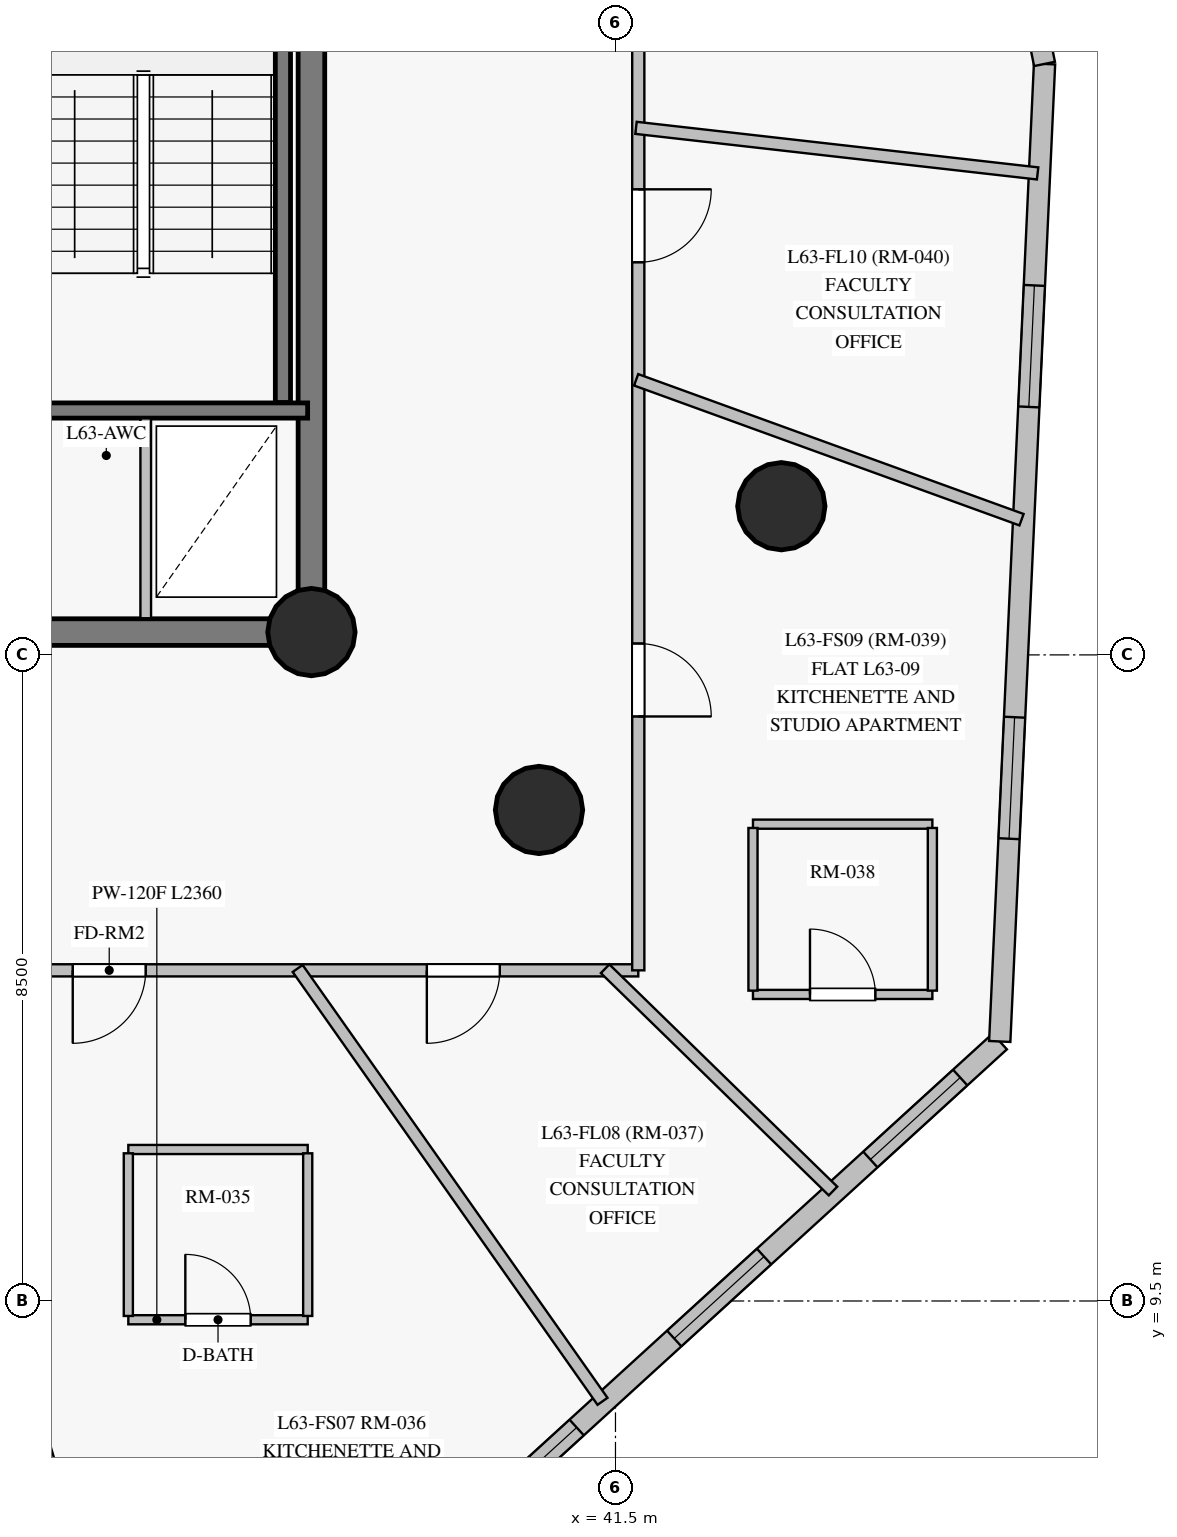
"""IFC4 building model, lengths in metres.
Left out: names, types, materials, properties, quantities, classifications, styles, units other than length and angle.
Written with IfcOpenShell. Run it as: python <this file> out.ifc"""

import sys

from ifc_helpers import new_model, si_unit, direction, frame, frame_2d, origin, origin_with_axes, origin_2d, place, context, subcontext, project, spatial, rectangle, circle, extrude, source, transform, mapped, element, fill, save


model = new_model("IFC4")
c1 = context("Model", 3, precision=1e-05, world=origin(), true_north=direction((0.0, 1.0)))
c2 = subcontext(c1, "Body", "Model", "MODEL_VIEW")
j1 = project(units=[si_unit("LENGTHUNIT", "METRE"), si_unit("PLANEANGLEUNIT", "RADIAN")], contexts=[c1])
p1 = place(None, origin())
s1 = spatial("IfcSite", under=j1, at=p1, CompositionType="ELEMENT")
p2 = place(p1, origin())
s2 = spatial("IfcBuilding", under=s1, at=p2, CompositionType="ELEMENT")
p3 = place(p2, frame((0.0, 0.0, 216.9)))
s3 = spatial("IfcBuildingStorey", under=s2, at=p3, CompositionType="ELEMENT", Elevation=216.9)
p4 = place(p3, frame((26.55, 18.3, 0.0), z_axis=(0.0, 0.0, 1.0), x_axis=(1.0, 0.0, 0.0)))
e1 = element("IfcWall", 1, at=p4, inside=s3, PredefinedType="SHEAR", context=c2, shape_type="SweptSolid", body=[
    extrude(rectangle(XDim=10.95, YDim=0.35, at=frame_2d((5.475, 0.0))), origin(), (0.0, 0.0, 1.0), 2.85),
])
p5 = place(p4, frame((4.55, 0.0, 0.0)))
e2 = element("IfcOpeningElement", 2, at=p5, cuts=e1, PredefinedType="OPENING", context=c2, shape_type="SweptSolid", body=[
    extrude(rectangle(XDim=1.4, YDim=2.2, at=frame_2d((0.7, 1.1))), frame((0.0, 0.185, 0.0), z_axis=(0.0, -1.0, 0.0), x_axis=(1.0, 0.0, 0.0)), (0.0, 0.0, 1.0), 0.37),
])
p6 = place(p3, frame((37.5, 18.3, 0.0), z_axis=(0.0, 0.0, 1.0), x_axis=(0.0, 1.0, 0.0)))
e3 = element("IfcWall", 3, at=p6, inside=s3, PredefinedType="SHEAR", context=c2, shape_type="SweptSolid", body=[
    extrude(rectangle(XDim=16.4, YDim=0.35, at=frame_2d((8.2, 0.0))), origin(), (0.0, 0.0, 1.0), 2.85),
])
p7 = place(p6, frame((13.85, 0.0, 0.0)))
e4 = element("IfcOpeningElement", 4, at=p7, cuts=e3, PredefinedType="OPENING", context=c2, shape_type="SweptSolid", body=[
    extrude(rectangle(XDim=1.2, YDim=2.15, at=frame_2d((0.6, 1.075))), frame((0.0, 0.185, 0.0), z_axis=(0.0, -1.0, 0.0), x_axis=(1.0, 0.0, 0.0)), (0.0, 0.0, 1.0), 0.37),
])
m1 = source(origin_with_axes(), c2, "Body", "SweptSolid", [
    extrude(circle(Radius=0.575, at=origin_2d()), origin(), (0.0, 0.0, 1.0), 3.05),
])
for number, where, z_axis, x_axis in (
    (5, (37.5, 18.3, 0.0), (0.0, 0.0, 1.0), (1.0, 0.0, 0.0)),
    (6, (43.682, 19.956, 0.0), (0.0, 0.0, 1.0), (1.0, 0.0, 0.0)),
    (7, (40.494, 15.96, 0.0), (0.0, 0.0, 1.0), (1.0, 0.0, 0.0)),
):
    element("IfcColumn", number, at=place(p3, frame(where, z_axis=z_axis, x_axis=x_axis)), inside=s3, PredefinedType="COLUMN", context=c2, shape_type="MappedRepresentation", body=[
        mapped(m1, transform((0.0, 0.0, 0.0), scale=1.0)),
    ])
p8 = place(p3, frame((39.403, 6.388, 0.0), z_axis=(0.0, 0.0, 1.0), x_axis=(0.738681440001, 0.674054693774, 0.0)))
e8 = element("IfcWall", 8, at=p8, inside=s3, PredefinedType="SOLIDWALL", context=c2, shape_type="SweptSolid", body=[
    extrude(rectangle(XDim=9.682, YDim=0.28, at=frame_2d((4.841, 0.0))), origin(), (0.0, 0.0, 1.0), 2.85),
])
p9 = place(p8, frame((0.548, 0.0, 0.85)))
e9 = element("IfcOpeningElement", 9, at=p9, cuts=e8, PredefinedType="OPENING", context=c2, shape_type="SweptSolid", body=[
    extrude(rectangle(XDim=1.6, YDim=1.6, at=frame_2d((0.8, 0.8))), frame((0.0, 0.15, 0.0), z_axis=(0.0, -1.0, 0.0), x_axis=(1.0, 0.0, 0.0)), (0.0, 0.0, 1.0), 0.3),
])
p10 = place(p8, frame((3.885, 0.0, 0.85)))
e10 = element("IfcOpeningElement", 10, at=p10, cuts=e8, PredefinedType="OPENING", context=c2, shape_type="SweptSolid", body=[
    extrude(rectangle(XDim=1.6, YDim=1.6, at=frame_2d((0.8, 0.8))), frame((0.0, 0.15, 0.0), z_axis=(0.0, -1.0, 0.0), x_axis=(1.0, 0.0, 0.0)), (0.0, 0.0, 1.0), 0.3),
])
p11 = place(p8, frame((7.378, 0.0, 0.85)))
e11 = element("IfcOpeningElement", 11, at=p11, cuts=e8, PredefinedType="OPENING", context=c2, shape_type="SweptSolid", body=[
    extrude(rectangle(XDim=1.6, YDim=1.6, at=frame_2d((0.8, 0.8))), frame((0.0, 0.15, 0.0), z_axis=(0.0, -1.0, 0.0), x_axis=(1.0, 0.0, 0.0)), (0.0, 0.0, 1.0), 0.3),
])
p12 = place(p3, frame((46.555, 12.914, 0.0), z_axis=(0.0, 0.0, 1.0), x_axis=(0.045779275431, 0.998951579378, 0.0)))
e12 = element("IfcWall", 12, at=p12, inside=s3, PredefinedType="SOLIDWALL", context=c2, shape_type="SweptSolid", body=[
    extrude(rectangle(XDim=12.874, YDim=0.28, at=frame_2d((6.437, 0.0))), origin(), (0.0, 0.0, 1.0), 2.85),
])
p13 = place(p12, frame((2.67, 0.0, 0.85)))
e13 = element("IfcOpeningElement", 13, at=p13, cuts=e12, PredefinedType="OPENING", context=c2, shape_type="SweptSolid", body=[
    extrude(rectangle(XDim=1.6, YDim=1.6, at=frame_2d((0.8, 0.8))), frame((0.0, 0.15, 0.0), z_axis=(0.0, -1.0, 0.0), x_axis=(1.0, 0.0, 0.0)), (0.0, 0.0, 1.0), 0.3),
])
p14 = place(p12, frame((8.357, 0.0, 0.85)))
e14 = element("IfcOpeningElement", 14, at=p14, cuts=e12, PredefinedType="OPENING", context=c2, shape_type="SweptSolid", body=[
    extrude(rectangle(XDim=1.6, YDim=1.6, at=frame_2d((0.8, 0.8))), frame((0.0, 0.15, 0.0), z_axis=(0.0, -1.0, 0.0), x_axis=(1.0, 0.0, 0.0)), (0.0, 0.0, 1.0), 0.3),
])
p15 = place(p3, frame((47.145, 25.775, 0.0), z_axis=(0.0, 0.0, 1.0), x_axis=(-0.199719997546, 0.979853010701, 0.0)))
e15 = element("IfcWall", 15, at=p15, inside=s3, PredefinedType="SOLIDWALL", context=c2, shape_type="SweptSolid", body=[
    extrude(rectangle(XDim=8.869, YDim=0.28, at=frame_2d((4.434, 0.0))), origin(), (0.0, 0.0, 1.0), 2.85),
])
p16 = place(p15, frame((1.415, 0.0, 0.85)))
e16 = element("IfcOpeningElement", 16, at=p16, cuts=e15, PredefinedType="OPENING", context=c2, shape_type="SweptSolid", body=[
    extrude(rectangle(XDim=1.6, YDim=1.6, at=frame_2d((0.8, 0.8))), frame((0.0, 0.15, 0.0), z_axis=(0.0, -1.0, 0.0), x_axis=(1.0, 0.0, 0.0)), (0.0, 0.0, 1.0), 0.3),
])
p17 = place(p15, frame((5.086, 0.0, 0.85)))
e17 = element("IfcOpeningElement", 17, at=p17, cuts=e15, PredefinedType="OPENING", context=c2, shape_type="SweptSolid", body=[
    extrude(rectangle(XDim=1.6, YDim=1.6, at=frame_2d((0.8, 0.8))), frame((0.0, 0.15, 0.0), z_axis=(0.0, -1.0, 0.0), x_axis=(1.0, 0.0, 0.0)), (0.0, 0.0, 1.0), 0.3),
])
p18 = place(p3, frame((37.125, 21.32, 0.0), z_axis=(0.0, 0.0, 1.0), x_axis=(0.0, 1.0, 0.0)))
e18 = element("IfcWall", 18, at=p18, inside=s3, PredefinedType="SHEAR", context=c2, shape_type="SweptSolid", body=[
    extrude(rectangle(XDim=7.5, YDim=0.2, at=frame_2d((3.75, 0.0))), origin(), (0.0, 0.0, 1.0), 2.85),
])
p19 = place(p3, frame((33.455, 21.215, 0.0), z_axis=(0.0, 0.0, 1.0), x_axis=(1.0, 0.0, 0.0)))
e19 = element("IfcWall", 19, at=p19, inside=s3, PredefinedType="SHEAR", context=c2, shape_type="SweptSolid", body=[
    extrude(rectangle(XDim=3.995, YDim=0.2, at=frame_2d((1.998, 0.0))), origin(), (0.0, 0.0, 1.0), 2.85),
])
p20 = place(p3, frame((41.8, 13.85, 0.0), z_axis=(0.0, 0.0, 1.0), x_axis=(-1.0, 0.0, 0.0)))
e20 = element("IfcWall", 20, at=p20, inside=s3, PredefinedType="PARTITIONING", context=c2, shape_type="SweptSolid", body=[
    extrude(rectangle(XDim=25.05, YDim=0.16, at=frame_2d((12.525, 0.0))), origin(), (0.0, 0.0, 1.0), 2.3),
])
p21 = place(p20, frame((10.634, 0.0, 0.0)))
e21 = element("IfcOpeningElement", 21, at=p21, cuts=e20, PredefinedType="OPENING", context=c2, shape_type="SweptSolid", body=[
    extrude(rectangle(XDim=0.96, YDim=2.15, at=frame_2d((0.48, 1.075))), frame((0.0, 0.09, 0.0), z_axis=(0.0, -1.0, 0.0), x_axis=(1.0, 0.0, 0.0)), (0.0, 0.0, 1.0), 0.18),
])
p22 = place(p20, frame((6.48, 0.0, 0.0)))
e22 = element("IfcOpeningElement", 22, at=p22, cuts=e20, PredefinedType="OPENING", context=c2, shape_type="SweptSolid", body=[
    extrude(rectangle(XDim=0.96, YDim=2.15, at=frame_2d((0.48, 1.075))), frame((0.0, 0.09, 0.0), z_axis=(0.0, -1.0, 0.0), x_axis=(1.0, 0.0, 0.0)), (0.0, 0.0, 1.0), 0.18),
])
p23 = place(p20, frame((18.752, 0.0, 0.0)))
e23 = element("IfcOpeningElement", 23, at=p23, cuts=e20, PredefinedType="OPENING", context=c2, shape_type="SweptSolid", body=[
    extrude(rectangle(XDim=0.96, YDim=2.15, at=frame_2d((0.48, 1.075))), frame((0.0, 0.09, 0.0), z_axis=(0.0, -1.0, 0.0), x_axis=(1.0, 0.0, 0.0)), (0.0, 0.0, 1.0), 0.18),
])
p24 = place(p20, frame((15.808, 0.0, 0.0)))
e24 = element("IfcOpeningElement", 24, at=p24, cuts=e20, PredefinedType="OPENING", context=c2, shape_type="SweptSolid", body=[
    extrude(rectangle(XDim=0.96, YDim=2.15, at=frame_2d((0.48, 1.075))), frame((0.0, 0.09, 0.0), z_axis=(0.0, -1.0, 0.0), x_axis=(1.0, 0.0, 0.0)), (0.0, 0.0, 1.0), 0.18),
])
p25 = place(p20, frame((13.594, 0.0, 0.0)))
e25 = element("IfcOpeningElement", 25, at=p25, cuts=e20, PredefinedType="OPENING", context=c2, shape_type="SweptSolid", body=[
    extrude(rectangle(XDim=0.96, YDim=2.15, at=frame_2d((0.48, 1.075))), frame((0.0, 0.09, 0.0), z_axis=(0.0, -1.0, 0.0), x_axis=(1.0, 0.0, 0.0)), (0.0, 0.0, 1.0), 0.18),
])
p26 = place(p20, frame((1.822, 0.0, 0.0)))
e26 = element("IfcOpeningElement", 26, at=p26, cuts=e20, PredefinedType="OPENING", context=c2, shape_type="SweptSolid", body=[
    extrude(rectangle(XDim=0.96, YDim=2.15, at=frame_2d((0.48, 1.075))), frame((0.0, 0.09, 0.0), z_axis=(0.0, -1.0, 0.0), x_axis=(1.0, 0.0, 0.0)), (0.0, 0.0, 1.0), 0.18),
])
p27 = place(p3, frame((41.8, 33.45, 0.0), z_axis=(0.0, 0.0, 1.0), x_axis=(0.0, -1.0, 0.0)))
e27 = element("IfcWall", 27, at=p27, inside=s3, PredefinedType="PARTITIONING", context=c2, shape_type="SweptSolid", body=[
    extrude(rectangle(XDim=19.6, YDim=0.16, at=frame_2d((9.8, 0.0))), origin(), (0.0, 0.0, 1.0), 2.3),
])
p28 = place(p27, frame((15.3, 0.0, 0.0)))
e28 = element("IfcOpeningElement", 28, at=p28, cuts=e27, PredefinedType="OPENING", context=c2, shape_type="SweptSolid", body=[
    extrude(rectangle(XDim=0.96, YDim=2.15, at=frame_2d((0.48, 1.075))), frame((0.0, 0.09, 0.0), z_axis=(0.0, -1.0, 0.0), x_axis=(1.0, 0.0, 0.0)), (0.0, 0.0, 1.0), 0.18),
])
p29 = place(p27, frame((9.325, 0.0, 0.0)))
e29 = element("IfcOpeningElement", 29, at=p29, cuts=e27, PredefinedType="OPENING", context=c2, shape_type="SweptSolid", body=[
    extrude(rectangle(XDim=0.96, YDim=2.15, at=frame_2d((0.48, 1.075))), frame((0.0, 0.09, 0.0), z_axis=(0.0, -1.0, 0.0), x_axis=(1.0, 0.0, 0.0)), (0.0, 0.0, 1.0), 0.18),
])
p30 = place(p27, frame((6.385, 0.0, 0.0)))
e30 = element("IfcOpeningElement", 30, at=p30, cuts=e27, PredefinedType="OPENING", context=c2, shape_type="SweptSolid", body=[
    extrude(rectangle(XDim=0.96, YDim=2.15, at=frame_2d((0.48, 1.075))), frame((0.0, 0.09, 0.0), z_axis=(0.0, -1.0, 0.0), x_axis=(1.0, 0.0, 0.0)), (0.0, 0.0, 1.0), 0.18),
])
p31 = place(p3, frame((32.14, 13.879, 0.0), z_axis=(0.0, 0.0, 1.0), x_axis=(0.281466023859, -0.959571194552, 0.0)))
e31 = element("IfcWall", 31, at=p31, inside=s3, PredefinedType="PARTITIONING", context=c2, shape_type="SweptSolid", body=[
    extrude(rectangle(XDim=8.344, YDim=0.16, at=frame_2d((4.172, 0.0))), origin(), (0.0, 0.0, 1.0), 2.85),
])
p32 = place(p3, frame((37.319, 13.875, 0.0), z_axis=(0.0, 0.0, 1.0), x_axis=(0.575840662362, -0.817561943568, 0.0)))
e32 = element("IfcWall", 32, at=p32, inside=s3, PredefinedType="PARTITIONING", context=c2, shape_type="SweptSolid", body=[
    extrude(rectangle(XDim=6.965, YDim=0.16, at=frame_2d((3.482, 0.0))), origin(), (0.0, 0.0, 1.0), 2.85),
])
p33 = place(p3, frame((41.772, 21.619, 0.0), z_axis=(0.0, 0.0, 1.0), x_axis=(0.939996769693, -0.341183342158, 0.0)))
e33 = element("IfcWall", 33, at=p33, inside=s3, PredefinedType="PARTITIONING", context=c2, shape_type="SweptSolid", body=[
    extrude(rectangle(XDim=5.394, YDim=0.16, at=frame_2d((2.697, 0.0))), origin(), (0.0, 0.0, 1.0), 2.85),
])
p34 = place(p3, frame((41.77, 24.934, 0.0), z_axis=(0.0, 0.0, 1.0), x_axis=(0.993626894102, -0.112719099165, 0.0)))
e34 = element("IfcWall", 34, at=p34, inside=s3, PredefinedType="PARTITIONING", context=c2, shape_type="SweptSolid", body=[
    extrude(rectangle(XDim=5.317, YDim=0.16, at=frame_2d((2.659, 0.0))), origin(), (0.0, 0.0, 1.0), 2.85),
])
p35 = place(p3, frame((41.364, 13.871, 0.0), z_axis=(0.0, 0.0, 1.0), x_axis=(0.715911992073, -0.698190532453, 0.0)))
e35 = element("IfcWall", 35, at=p35, inside=s3, PredefinedType="PARTITIONING", context=c2, shape_type="SweptSolid", body=[
    extrude(rectangle(XDim=4.188, YDim=0.16, at=frame_2d((2.094, 0.0))), origin(), (0.0, 0.0, 1.0), 2.85),
])
p36 = place(p3, frame((35.091, 9.253, 0.0), z_axis=(0.0, 0.0, 1.0), x_axis=(1.0, 0.0, 0.0)))
e36 = element("IfcWall", 36, at=p36, inside=s3, PredefinedType="PARTITIONING", context=c2, shape_type="SweptSolid", body=[
    extrude(rectangle(XDim=2.36, YDim=0.12, at=frame_2d((1.18, 0.0))), origin(), (0.0, 0.0, 1.0), 2.85),
])
p37 = place(p36, frame((0.75, 0.0, 0.0)))
e37 = element("IfcOpeningElement", 37, at=p37, cuts=e36, PredefinedType="OPENING", context=c2, shape_type="SweptSolid", body=[
    extrude(rectangle(XDim=0.86, YDim=2.1, at=frame_2d((0.43, 1.05))), frame((0.0, 0.07, 0.0), z_axis=(0.0, -1.0, 0.0), x_axis=(1.0, 0.0, 0.0)), (0.0, 0.0, 1.0), 0.14),
])
p38 = place(p3, frame((37.451, 11.493, 0.0), z_axis=(0.0, 0.0, 1.0), x_axis=(-1.0, 0.0, 0.0)))
e38 = element("IfcWall", 38, at=p38, inside=s3, PredefinedType="PARTITIONING", context=c2, shape_type="SweptSolid", body=[
    extrude(rectangle(XDim=2.36, YDim=0.12, at=frame_2d((1.18, 0.0))), origin(), (0.0, 0.0, 1.0), 2.85),
])
p39 = place(p3, frame((43.309, 13.533, 0.0), z_axis=(0.0, 0.0, 1.0), x_axis=(1.0, 0.0, 0.0)))
e39 = element("IfcWall", 39, at=p39, inside=s3, PredefinedType="PARTITIONING", context=c2, shape_type="SweptSolid", body=[
    extrude(rectangle(XDim=2.36, YDim=0.12, at=frame_2d((1.18, 0.0))), origin(), (0.0, 0.0, 1.0), 2.85),
])
p40 = place(p39, frame((0.75, 0.0, 0.0)))
e40 = element("IfcOpeningElement", 40, at=p40, cuts=e39, PredefinedType="OPENING", context=c2, shape_type="SweptSolid", body=[
    extrude(rectangle(XDim=0.86, YDim=2.1, at=frame_2d((0.43, 1.05))), frame((0.0, 0.07, 0.0), z_axis=(0.0, -1.0, 0.0), x_axis=(1.0, 0.0, 0.0)), (0.0, 0.0, 1.0), 0.14),
])
p41 = place(p3, frame((45.669, 15.773, 0.0), z_axis=(0.0, 0.0, 1.0), x_axis=(-1.0, 0.0, 0.0)))
e41 = element("IfcWall", 41, at=p41, inside=s3, PredefinedType="PARTITIONING", context=c2, shape_type="SweptSolid", body=[
    extrude(rectangle(XDim=2.36, YDim=0.12, at=frame_2d((1.18, 0.0))), origin(), (0.0, 0.0, 1.0), 2.85),
])
p42 = place(p3, frame((35.32, 18.482, 0.0), z_axis=(0.0, 0.0, 1.0), x_axis=(0.0, 1.0, 0.0)))
e42 = element("IfcWall", 42, at=p42, inside=s3, PredefinedType="PARTITIONING", context=c2, shape_type="SweptSolid", body=[
    extrude(rectangle(XDim=2.629, YDim=0.14, at=frame_2d((1.314, 0.0))), origin(), (0.0, 0.0, 1.0), 2.85),
])
for number, where, z_axis, x_axis in (
    (43, (45.669, 13.583, 0.0), (0.0, 0.0, 1.0), (0.0, 1.0, 0.0)),
    (44, (43.309, 15.723, 0.0), (0.0, 0.0, 1.0), (0.0, -1.0, 0.0)),
):
    element("IfcWall", number, at=place(p3, frame(where, z_axis=z_axis, x_axis=x_axis)), inside=s3, PredefinedType="PARTITIONING", context=c2, shape_type="SweptSolid", body=[
        extrude(rectangle(XDim=2.14, YDim=0.12, at=frame_2d((1.07, 0.0))), origin(), (0.0, 0.0, 1.0), 2.85),
    ])
for number, where, z_axis, x_axis in (
    (45, (37.451, 9.303, 0.0), (0.0, 0.0, 1.0), (0.0, 1.0, 0.0)),
    (46, (35.091, 11.443, 0.0), (0.0, 0.0, 1.0), (0.0, -1.0, 0.0)),
):
    element("IfcWall", number, at=place(p3, frame(where, z_axis=z_axis, x_axis=x_axis)), inside=s3, PredefinedType="PARTITIONING", context=c2, shape_type="SweptSolid", body=[
        extrude(rectangle(XDim=2.14, YDim=0.12, at=frame_2d((1.07, 0.0))), origin(), (0.0, 0.0, 1.0), 2.85),
    ])
m2 = source(origin_with_axes(), c2, "Body", "SweptSolid", [
    extrude(rectangle(XDim=1.6, YDim=1.6, at=frame_2d((0.8, 0.8))), frame((0.0, 0.03, 0.0), z_axis=(0.0, -1.0, 0.0), x_axis=(1.0, 0.0, 0.0)), (0.0, 0.0, 1.0), 0.06),
])
p43 = place(p9, origin())
e47 = element("IfcWindow", 47, at=p43, inside=s3, PartitioningType="SINGLE_PANEL", PredefinedType="WINDOW", context=c2, shape_type="MappedRepresentation", body=[
    mapped(m2, transform((0.0, 0.0, 0.0), scale=1.0)),
])
fill(e9, e47)
p44 = place(p10, origin())
e48 = element("IfcWindow", 48, at=p44, inside=s3, PartitioningType="SINGLE_PANEL", PredefinedType="WINDOW", context=c2, shape_type="MappedRepresentation", body=[
    mapped(m2, transform((0.0, 0.0, 0.0), scale=1.0)),
])
fill(e10, e48)
p45 = place(p11, origin())
e49 = element("IfcWindow", 49, at=p45, inside=s3, PartitioningType="SINGLE_PANEL", PredefinedType="WINDOW", context=c2, shape_type="MappedRepresentation", body=[
    mapped(m2, transform((0.0, 0.0, 0.0), scale=1.0)),
])
fill(e11, e49)
p46 = place(p13, origin())
e50 = element("IfcWindow", 50, at=p46, inside=s3, PartitioningType="SINGLE_PANEL", PredefinedType="WINDOW", context=c2, shape_type="MappedRepresentation", body=[
    mapped(m2, transform((0.0, 0.0, 0.0), scale=1.0)),
])
fill(e13, e50)
p47 = place(p14, origin())
e51 = element("IfcWindow", 51, at=p47, inside=s3, PartitioningType="SINGLE_PANEL", PredefinedType="WINDOW", context=c2, shape_type="MappedRepresentation", body=[
    mapped(m2, transform((0.0, 0.0, 0.0), scale=1.0)),
])
fill(e14, e51)
m3 = source(origin_with_axes(), c2, "Body", "SweptSolid", [
    extrude(rectangle(XDim=0.86, YDim=2.1, at=frame_2d((0.43, 1.05))), frame((0.0, 0.025, 0.0), z_axis=(0.0, -1.0, 0.0), x_axis=(1.0, 0.0, 0.0)), (0.0, 0.0, 1.0), 0.05),
])
p48 = place(p37, origin())
e52 = element("IfcDoor", 52, at=p48, inside=s3, OperationType="SINGLE_SWING_LEFT", PredefinedType="DOOR", context=c2, shape_type="MappedRepresentation", body=[
    mapped(m3, transform((0.0, 0.0, 0.0), scale=1.0)),
])
fill(e37, e52)
m4 = source(origin_with_axes(), c2, "Body", "SweptSolid", [
    extrude(rectangle(XDim=0.96, YDim=2.15, at=frame_2d((0.48, 1.075))), frame((0.0, 0.025, 0.0), z_axis=(0.0, -1.0, 0.0), x_axis=(1.0, 0.0, 0.0)), (0.0, 0.0, 1.0), 0.05),
])
p49 = place(p22, origin())
e53 = element("IfcDoor", 53, at=p49, inside=s3, OperationType="SINGLE_SWING_RIGHT", PredefinedType="DOOR", context=c2, shape_type="MappedRepresentation", body=[
    mapped(m4, transform((0.0, 0.0, 0.0), scale=1.0)),
])
fill(e22, e53)
p50 = place(p40, origin())
e54 = element("IfcDoor", 54, at=p50, inside=s3, OperationType="SINGLE_SWING_LEFT", PredefinedType="DOOR", context=c2, shape_type="MappedRepresentation", body=[
    mapped(m3, transform((0.0, 0.0, 0.0), scale=1.0)),
])
fill(e40, e54)
p51 = place(p28, origin())
e55 = element("IfcDoor", 55, at=p51, inside=s3, OperationType="SINGLE_SWING_RIGHT", PredefinedType="DOOR", context=c2, shape_type="MappedRepresentation", body=[
    mapped(m4, transform((0.0, 0.0, 0.0), scale=1.0)),
])
fill(e28, e55)
p52 = place(p26, origin())
e56 = element("IfcDoor", 56, at=p52, inside=s3, OperationType="SINGLE_SWING_RIGHT", PredefinedType="DOOR", context=c2, shape_type="MappedRepresentation", body=[
    mapped(m4, transform((0.0, 0.0, 0.0), scale=1.0)),
])
fill(e26, e56)
p53 = place(p29, origin())
e57 = element("IfcDoor", 57, at=p53, inside=s3, OperationType="SINGLE_SWING_LEFT", PredefinedType="DOOR", context=c2, shape_type="MappedRepresentation", body=[
    mapped(m4, transform((0.0, 0.0, 0.0), scale=1.0)),
])
fill(e29, e57)
save(model, sys.argv[1])
